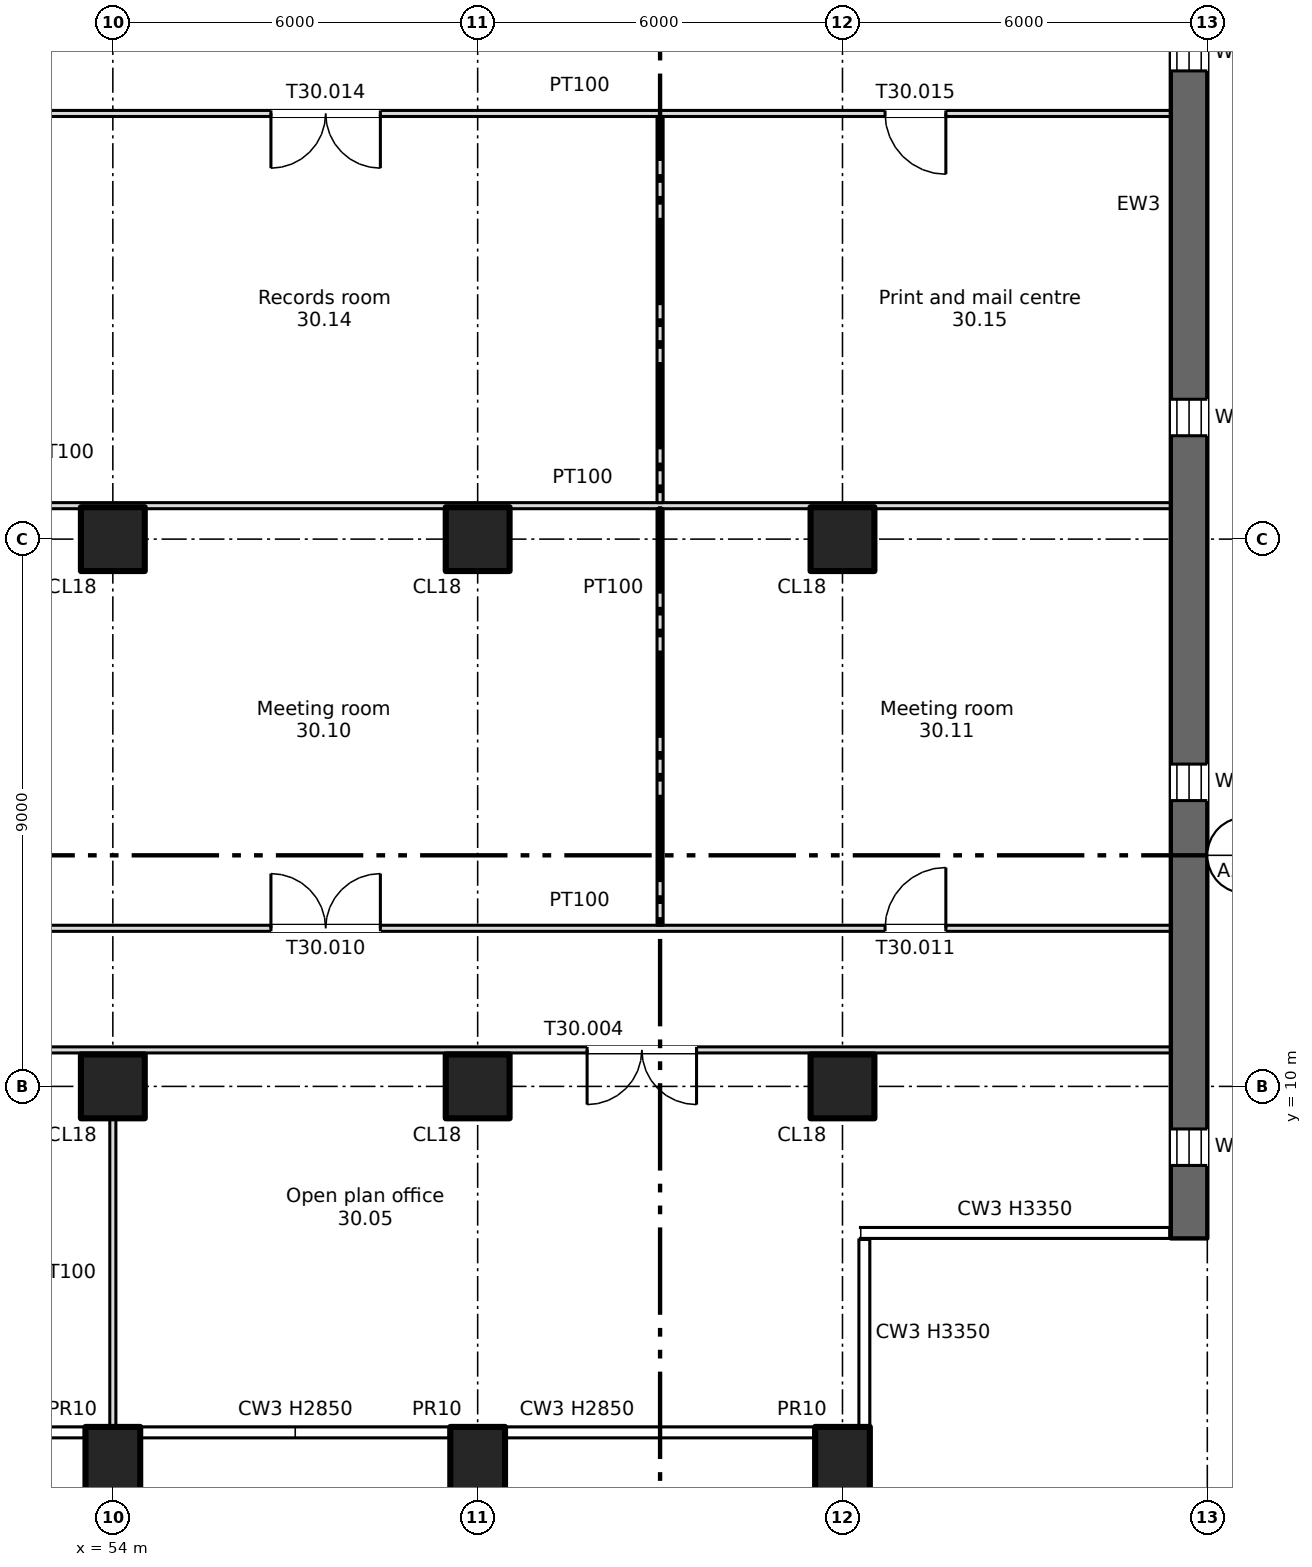
"""IFC4 building model, lengths in metres.
Left out: names, types, materials, properties, quantities, classifications, styles, units other than length and angle.
Written with IfcOpenShell. Run it as: python <this file> out.ifc"""

import sys

from ifc_helpers import new_model, si_unit, direction, frame, frame_2d, origin, origin_2d, place, context, subcontext, project, spatial, rectangle, extrude, element, fill, save


model = new_model("IFC4")
c1 = context("Model", 3, precision=1e-05, world=origin(), true_north=direction((0.0, 1.0)))
c2 = subcontext(c1, "Body", "Model", "MODEL_VIEW")
j1 = project(units=[si_unit("LENGTHUNIT", "METRE"), si_unit("PLANEANGLEUNIT", "RADIAN")], contexts=[c1])
p1 = place(None, origin())
s1 = spatial("IfcSite", under=j1, at=p1, CompositionType="ELEMENT")
p2 = place(p1, origin())
s2 = spatial("IfcBuilding", under=s1, at=p2, CompositionType="ELEMENT")
p3 = place(p2, frame((0.0, 0.0, 208.0)))
s3 = spatial("IfcBuildingStorey", under=s2, at=p3, CompositionType="ELEMENT", Elevation=208.0)
for number, where, z_axis, x_axis in (
    (1, (54.0, 3.7, -0.4), (0.0, 0.0, 1.0), (1.0, 0.0, 0.0)),
    (2, (60.0, 3.7, -0.4), (0.0, 0.0, 1.0), (1.0, 0.0, 0.0)),
    (3, (66.0, 3.7, -0.4), (0.0, 0.0, 1.0), (1.0, 0.0, 0.0)),
):
    element("IfcColumn", number, at=place(p3, frame(where, z_axis=z_axis, x_axis=x_axis)), inside=s3, PredefinedType="COLUMN", context=c2, shape_type="SweptSolid", body=[
        extrude(rectangle(XDim=0.9, YDim=1.4, at=origin_2d()), origin(), (0.0, 0.0, 1.0), 3.75),
    ])
for number, where, z_axis, x_axis in (
    (4, (54.0, 10.0, 0.0), (0.0, 0.0, 1.0), (1.0, 0.0, 0.0)),
    (5, (54.0, 19.0, 0.0), (0.0, 0.0, 1.0), (1.0, 0.0, 0.0)),
    (6, (60.0, 10.0, 0.0), (0.0, 0.0, 1.0), (1.0, 0.0, 0.0)),
    (7, (60.0, 19.0, 0.0), (0.0, 0.0, 1.0), (1.0, 0.0, 0.0)),
    (8, (66.0, 10.0, 0.0), (0.0, 0.0, 1.0), (1.0, 0.0, 0.0)),
    (9, (66.0, 19.0, 0.0), (0.0, 0.0, 1.0), (1.0, 0.0, 0.0)),
):
    element("IfcColumn", number, at=place(p3, frame(where, z_axis=z_axis, x_axis=x_axis)), inside=s3, PredefinedType="COLUMN", context=c2, shape_type="SweptSolid", body=[
        extrude(rectangle(XDim=1.05, YDim=1.05, at=origin_2d()), origin(), (0.0, 0.0, 1.0), 3.35),
    ])
p4 = place(p3, frame((71.7, 7.5, 0.0), z_axis=(0.0, 0.0, 1.0), x_axis=(0.0, 1.0, 0.0)))
e10 = element("IfcWall", 10, at=p4, inside=s3, PredefinedType="SHEAR", context=c2, shape_type="SweptSolid", body=[
    extrude(rectangle(XDim=34.0, YDim=0.6, at=frame_2d((17.0, 0.0))), origin(), (0.0, 0.0, 1.0), 3.35),
])
p5 = place(p4, frame((1.2, 0.0, 0.6)))
e11 = element("IfcOpeningElement", 11, at=p5, cuts=e10, PredefinedType="OPENING", context=c2, shape_type="SweptSolid", body=[
    extrude(rectangle(XDim=0.6, YDim=2.4, at=frame_2d((0.3, 1.2))), frame((0.0, 0.31, 0.0), z_axis=(0.0, -1.0, 0.0), x_axis=(1.0, 0.0, 0.0)), (0.0, 0.0, 1.0), 0.62),
])
p6 = place(p4, frame((7.2, 0.0, 0.6)))
e12 = element("IfcOpeningElement", 12, at=p6, cuts=e10, PredefinedType="OPENING", context=c2, shape_type="SweptSolid", body=[
    extrude(rectangle(XDim=0.6, YDim=2.4, at=frame_2d((0.3, 1.2))), frame((0.0, 0.31, 0.0), z_axis=(0.0, -1.0, 0.0), x_axis=(1.0, 0.0, 0.0)), (0.0, 0.0, 1.0), 0.62),
])
p7 = place(p4, frame((13.2, 0.0, 0.6)))
e13 = element("IfcOpeningElement", 13, at=p7, cuts=e10, PredefinedType="OPENING", context=c2, shape_type="SweptSolid", body=[
    extrude(rectangle(XDim=0.6, YDim=2.4, at=frame_2d((0.3, 1.2))), frame((0.0, 0.31, 0.0), z_axis=(0.0, -1.0, 0.0), x_axis=(1.0, 0.0, 0.0)), (0.0, 0.0, 1.0), 0.62),
])
p8 = place(p4, frame((19.2, 0.0, 0.6)))
e14 = element("IfcOpeningElement", 14, at=p8, cuts=e10, PredefinedType="OPENING", context=c2, shape_type="SweptSolid", body=[
    extrude(rectangle(XDim=0.6, YDim=2.4, at=frame_2d((0.3, 1.2))), frame((0.0, 0.31, 0.0), z_axis=(0.0, -1.0, 0.0), x_axis=(1.0, 0.0, 0.0)), (0.0, 0.0, 1.0), 0.62),
])
p9 = place(p4, frame((25.2, 0.0, 0.6)))
e15 = element("IfcOpeningElement", 15, at=p9, cuts=e10, PredefinedType="OPENING", context=c2, shape_type="SweptSolid", body=[
    extrude(rectangle(XDim=0.6, YDim=2.4, at=frame_2d((0.3, 1.2))), frame((0.0, 0.31, 0.0), z_axis=(0.0, -1.0, 0.0), x_axis=(1.0, 0.0, 0.0)), (0.0, 0.0, 1.0), 0.62),
])
p10 = place(p4, frame((31.2, 0.0, 0.6)))
e16 = element("IfcOpeningElement", 16, at=p10, cuts=e10, PredefinedType="OPENING", context=c2, shape_type="SweptSolid", body=[
    extrude(rectangle(XDim=0.6, YDim=2.4, at=frame_2d((0.3, 1.2))), frame((0.0, 0.31, 0.0), z_axis=(0.0, -1.0, 0.0), x_axis=(1.0, 0.0, 0.0)), (0.0, 0.0, 1.0), 0.62),
])
p11 = place(p3, frame((6.6, 10.6, 0.0), z_axis=(0.0, 0.0, 1.0), x_axis=(1.0, 0.0, 0.0)))
e17 = element("IfcWall", 17, at=p11, inside=s3, PredefinedType="PARTITIONING", context=c2, shape_type="SweptSolid", body=[
    extrude(rectangle(XDim=64.8, YDim=0.1, at=frame_2d((32.4, 0.0))), origin(), (0.0, 0.0, 1.0), 3.35),
])
p12 = place(p11, frame((30.0, 0.0, 0.0)))
e18 = element("IfcOpeningElement", 18, at=p12, cuts=e17, PredefinedType="OPENING", context=c2, shape_type="SweptSolid", body=[
    extrude(rectangle(XDim=1.8, YDim=2.1, at=frame_2d((0.9, 1.05))), frame((0.0, 0.06, 0.0), z_axis=(0.0, -1.0, 0.0), x_axis=(1.0, 0.0, 0.0)), (0.0, 0.0, 1.0), 0.12),
])
p13 = place(p11, frame((42.0, 0.0, 0.0)))
e19 = element("IfcOpeningElement", 19, at=p13, cuts=e17, PredefinedType="OPENING", context=c2, shape_type="SweptSolid", body=[
    extrude(rectangle(XDim=1.8, YDim=2.1, at=frame_2d((0.9, 1.05))), frame((0.0, 0.06, 0.0), z_axis=(0.0, -1.0, 0.0), x_axis=(1.0, 0.0, 0.0)), (0.0, 0.0, 1.0), 0.12),
])
p14 = place(p11, frame((12.05, 0.0, 0.0)))
e20 = element("IfcOpeningElement", 20, at=p14, cuts=e17, PredefinedType="OPENING", context=c2, shape_type="SweptSolid", body=[
    extrude(rectangle(XDim=1.8, YDim=2.1, at=frame_2d((0.9, 1.05))), frame((0.0, 0.06, 0.0), z_axis=(0.0, -1.0, 0.0), x_axis=(1.0, 0.0, 0.0)), (0.0, 0.0, 1.0), 0.12),
])
p15 = place(p11, frame((55.2, 0.0, 0.0)))
e21 = element("IfcOpeningElement", 21, at=p15, cuts=e17, PredefinedType="OPENING", context=c2, shape_type="SweptSolid", body=[
    extrude(rectangle(XDim=1.8, YDim=2.1, at=frame_2d((0.9, 1.05))), frame((0.0, 0.06, 0.0), z_axis=(0.0, -1.0, 0.0), x_axis=(1.0, 0.0, 0.0)), (0.0, 0.0, 1.0), 0.12),
])
p16 = place(p3, frame((51.95, 12.6, 0.0), z_axis=(0.0, 0.0, 1.0), x_axis=(1.0, 0.0, 0.0)))
e22 = element("IfcWall", 22, at=p16, inside=s3, PredefinedType="PARTITIONING", context=c2, shape_type="SweptSolid", body=[
    extrude(rectangle(XDim=19.45, YDim=0.1, at=frame_2d((9.725, 0.0))), origin(), (0.0, 0.0, 1.0), 3.35),
])
p17 = place(p16, frame((4.65, 0.0, 0.0)))
e23 = element("IfcOpeningElement", 23, at=p17, cuts=e22, PredefinedType="OPENING", context=c2, shape_type="SweptSolid", body=[
    extrude(rectangle(XDim=1.8, YDim=2.1, at=frame_2d((0.9, 1.05))), frame((0.0, 0.06, 0.0), z_axis=(0.0, -1.0, 0.0), x_axis=(1.0, 0.0, 0.0)), (0.0, 0.0, 1.0), 0.12),
])
p18 = place(p16, frame((14.75, 0.0, 0.0)))
e24 = element("IfcOpeningElement", 24, at=p18, cuts=e22, PredefinedType="OPENING", context=c2, shape_type="SweptSolid", body=[
    extrude(rectangle(XDim=1.0, YDim=2.1, at=frame_2d((0.5, 1.05))), frame((0.0, 0.06, 0.0), z_axis=(0.0, -1.0, 0.0), x_axis=(1.0, 0.0, 0.0)), (0.0, 0.0, 1.0), 0.12),
])
p19 = place(p3, frame((52.05, 19.55, 0.0), z_axis=(0.0, 0.0, 1.0), x_axis=(1.0, 0.0, 0.0)))
e25 = element("IfcWall", 25, at=p19, inside=s3, PredefinedType="PARTITIONING", context=c2, shape_type="SweptSolid", body=[
    extrude(rectangle(XDim=19.35, YDim=0.1, at=frame_2d((9.675, 0.0))), origin(), (0.0, 0.0, 1.0), 3.35),
])
p20 = place(p3, frame((51.95, 26.0, 0.0), z_axis=(0.0, 0.0, 1.0), x_axis=(1.0, 0.0, 0.0)))
e26 = element("IfcWall", 26, at=p20, inside=s3, PredefinedType="PARTITIONING", context=c2, shape_type="SweptSolid", body=[
    extrude(rectangle(XDim=19.45, YDim=0.1, at=frame_2d((9.725, 0.0))), origin(), (0.0, 0.0, 1.0), 3.35),
])
p21 = place(p20, frame((4.65, 0.0, 0.0)))
e27 = element("IfcOpeningElement", 27, at=p21, cuts=e26, PredefinedType="OPENING", context=c2, shape_type="SweptSolid", body=[
    extrude(rectangle(XDim=1.8, YDim=2.1, at=frame_2d((0.9, 1.05))), frame((0.0, 0.06, 0.0), z_axis=(0.0, -1.0, 0.0), x_axis=(1.0, 0.0, 0.0)), (0.0, 0.0, 1.0), 0.12),
])
p22 = place(p20, frame((14.75, 0.0, 0.0)))
e28 = element("IfcOpeningElement", 28, at=p22, cuts=e26, PredefinedType="OPENING", context=c2, shape_type="SweptSolid", body=[
    extrude(rectangle(XDim=1.0, YDim=2.1, at=frame_2d((0.5, 1.05))), frame((0.0, 0.06, 0.0), z_axis=(0.0, -1.0, 0.0), x_axis=(1.0, 0.0, 0.0)), (0.0, 0.0, 1.0), 0.12),
])
p23 = place(p3, frame((54.0, 4.4, 0.0), z_axis=(0.0, 0.0, 1.0), x_axis=(0.0, 1.0, 0.0)))
e29 = element("IfcWall", 29, at=p23, inside=s3, PredefinedType="PARTITIONING", context=c2, shape_type="SweptSolid", body=[
    extrude(rectangle(XDim=5.075, YDim=0.1, at=frame_2d((2.538, 0.0))), origin(), (0.0, 0.0, 1.0), 3.35),
])
p24 = place(p3, frame((63.0, 12.65, 0.0), z_axis=(0.0, 0.0, 1.0), x_axis=(0.0, 1.0, 0.0)))
e30 = element("IfcWall", 30, at=p24, inside=s3, PredefinedType="PARTITIONING", context=c2, shape_type="SweptSolid", body=[
    extrude(rectangle(XDim=6.85, YDim=0.1, at=frame_2d((3.425, 0.0))), origin(), (0.0, 0.0, 1.0), 3.35),
])
p25 = place(p3, frame((63.0, 19.6, 0.0), z_axis=(0.0, 0.0, 1.0), x_axis=(0.0, 1.0, 0.0)))
e31 = element("IfcWall", 31, at=p25, inside=s3, PredefinedType="PARTITIONING", context=c2, shape_type="SweptSolid", body=[
    extrude(rectangle(XDim=6.35, YDim=0.1, at=frame_2d((3.175, 0.0))), origin(), (0.0, 0.0, 1.0), 3.35),
])
p26 = place(p5, origin())
e32 = element("IfcWindow", 32, at=p26, inside=s3, PartitioningType="SINGLE_PANEL", PredefinedType="WINDOW", context=c2, shape_type="SweptSolid", body=[
    extrude(rectangle(XDim=0.6, YDim=2.4, at=frame_2d((0.3, 1.2))), frame((0.0, 0.03, 0.0), z_axis=(0.0, -1.0, 0.0), x_axis=(1.0, 0.0, 0.0)), (0.0, 0.0, 1.0), 0.06),
])
fill(e11, e32)
p27 = place(p6, origin())
e33 = element("IfcWindow", 33, at=p27, inside=s3, PartitioningType="SINGLE_PANEL", PredefinedType="WINDOW", context=c2, shape_type="SweptSolid", body=[
    extrude(rectangle(XDim=0.6, YDim=2.4, at=frame_2d((0.3, 1.2))), frame((0.0, 0.03, 0.0), z_axis=(0.0, -1.0, 0.0), x_axis=(1.0, 0.0, 0.0)), (0.0, 0.0, 1.0), 0.06),
])
fill(e12, e33)
p28 = place(p7, origin())
e34 = element("IfcWindow", 34, at=p28, inside=s3, PartitioningType="SINGLE_PANEL", PredefinedType="WINDOW", context=c2, shape_type="SweptSolid", body=[
    extrude(rectangle(XDim=0.6, YDim=2.4, at=frame_2d((0.3, 1.2))), frame((0.0, 0.03, 0.0), z_axis=(0.0, -1.0, 0.0), x_axis=(1.0, 0.0, 0.0)), (0.0, 0.0, 1.0), 0.06),
])
fill(e13, e34)
p29 = place(p8, origin())
e35 = element("IfcWindow", 35, at=p29, inside=s3, PartitioningType="SINGLE_PANEL", PredefinedType="WINDOW", context=c2, shape_type="SweptSolid", body=[
    extrude(rectangle(XDim=0.6, YDim=2.4, at=frame_2d((0.3, 1.2))), frame((0.0, 0.03, 0.0), z_axis=(0.0, -1.0, 0.0), x_axis=(1.0, 0.0, 0.0)), (0.0, 0.0, 1.0), 0.06),
])
fill(e14, e35)
p30 = place(p15, origin())
e36 = element("IfcDoor", 36, at=p30, inside=s3, OperationType="DOUBLE_DOOR_SINGLE_SWING", PredefinedType="DOOR", context=c2, shape_type="SweptSolid", body=[
    extrude(rectangle(XDim=1.8, YDim=2.1, at=frame_2d((0.9, 1.05))), frame((0.0, 0.025, 0.0), z_axis=(0.0, -1.0, 0.0), x_axis=(1.0, 0.0, 0.0)), (0.0, 0.0, 1.0), 0.05),
])
fill(e21, e36)
p31 = place(p17, origin())
e37 = element("IfcDoor", 37, at=p31, inside=s3, OperationType="DOUBLE_DOOR_SINGLE_SWING", PredefinedType="DOOR", context=c2, shape_type="SweptSolid", body=[
    extrude(rectangle(XDim=1.8, YDim=2.1, at=frame_2d((0.9, 1.05))), frame((0.0, 0.025, 0.0), z_axis=(0.0, -1.0, 0.0), x_axis=(1.0, 0.0, 0.0)), (0.0, 0.0, 1.0), 0.05),
])
fill(e23, e37)
p32 = place(p18, origin())
e38 = element("IfcDoor", 38, at=p32, inside=s3, OperationType="SINGLE_SWING_RIGHT", PredefinedType="DOOR", context=c2, shape_type="SweptSolid", body=[
    extrude(rectangle(XDim=1.0, YDim=2.1, at=frame_2d((0.5, 1.05))), frame((0.0, 0.025, 0.0), z_axis=(0.0, -1.0, 0.0), x_axis=(1.0, 0.0, 0.0)), (0.0, 0.0, 1.0), 0.05),
])
fill(e24, e38)
p33 = place(p21, origin())
e39 = element("IfcDoor", 39, at=p33, inside=s3, OperationType="DOUBLE_DOOR_SINGLE_SWING", PredefinedType="DOOR", context=c2, shape_type="SweptSolid", body=[
    extrude(rectangle(XDim=1.8, YDim=2.1, at=frame_2d((0.9, 1.05))), frame((0.0, 0.025, 0.0), z_axis=(0.0, -1.0, 0.0), x_axis=(1.0, 0.0, 0.0)), (0.0, 0.0, 1.0), 0.05),
])
fill(e27, e39)
p34 = place(p22, origin())
e40 = element("IfcDoor", 40, at=p34, inside=s3, OperationType="SINGLE_SWING_RIGHT", PredefinedType="DOOR", context=c2, shape_type="SweptSolid", body=[
    extrude(rectangle(XDim=1.0, YDim=2.1, at=frame_2d((0.5, 1.05))), frame((0.0, 0.025, 0.0), z_axis=(0.0, -1.0, 0.0), x_axis=(1.0, 0.0, 0.0)), (0.0, 0.0, 1.0), 0.05),
])
fill(e28, e40)
save(model, sys.argv[1])
